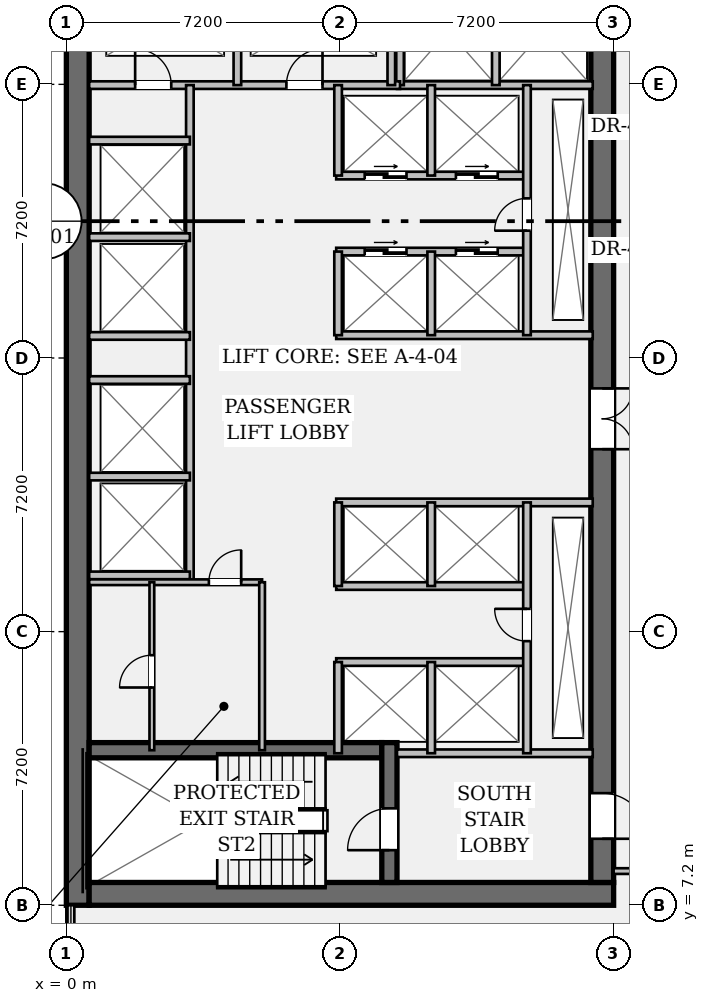
"""IFC4 building model, lengths in metres.
Left out: names, types, materials, properties, quantities, classifications, styles, units other than length and angle.
Written with IfcOpenShell. Run it as: python <this file> out.ifc"""

import sys

from ifc_helpers import new_model, si_unit, direction, frame, frame_2d, origin, place, context, subcontext, project, spatial, rectangle, extrude, element, fill, save


model = new_model("IFC4")
c1 = context("Model", 3, precision=1e-05, world=origin(), true_north=direction((0.0, 1.0)))
c2 = subcontext(c1, "Body", "Model", "MODEL_VIEW")
j1 = project(units=[si_unit("LENGTHUNIT", "METRE"), si_unit("PLANEANGLEUNIT", "RADIAN")], contexts=[c1])
p1 = place(None, origin())
s1 = spatial("IfcSite", under=j1, at=p1, CompositionType="ELEMENT")
p2 = place(p1, origin())
s2 = spatial("IfcBuilding", under=s1, at=p2, CompositionType="ELEMENT")
p3 = place(p2, frame((0.0, 0.0, 31.15)))
s3 = spatial("IfcBuildingStorey", under=s2, at=p3, CompositionType="ELEMENT", Elevation=31.15)
p4 = place(p3, frame((0.3, 7.2, 0.0), z_axis=(0.0, 0.0, 1.0), x_axis=(0.0, 1.0, 0.0)))
e1 = element("IfcWall", 1, at=p4, inside=s3, PredefinedType="SHEAR", context=c2, shape_type="SweptSolid", body=[
    extrude(rectangle(XDim=28.8, YDim=0.6, at=frame_2d((14.4, 0.0))), origin(), (0.0, 0.0, 1.0), 3.57),
])
p5 = place(p3, frame((0.6, 7.5, 0.0), z_axis=(0.0, 0.0, 1.0), x_axis=(1.0, 0.0, 0.0)))
e2 = element("IfcWall", 2, at=p5, inside=s3, PredefinedType="SHEAR", context=c2, shape_type="SweptSolid", body=[
    extrude(rectangle(XDim=13.8, YDim=0.6, at=frame_2d((6.9, 0.0))), origin(), (0.0, 0.0, 1.0), 3.57),
])
p6 = place(p3, frame((14.1, 35.4, 0.0), z_axis=(0.0, 0.0, 1.0), x_axis=(0.0, -1.0, 0.0)))
e3 = element("IfcWall", 3, at=p6, inside=s3, PredefinedType="SHEAR", context=c2, shape_type="SweptSolid", body=[
    extrude(rectangle(XDim=27.6, YDim=0.6, at=frame_2d((13.8, 0.0))), origin(), (0.0, 0.0, 1.0), 3.57),
])
p7 = place(p6, frame((1.3, 0.0, 0.0)))
e4 = element("IfcOpeningElement", 4, at=p7, cuts=e3, PredefinedType="OPENING", context=c2, shape_type="SweptSolid", body=[
    extrude(rectangle(XDim=1.2, YDim=2.15, at=frame_2d((0.6, 1.075))), frame((0.0, 0.312, 0.0), z_axis=(0.0, -1.0, 0.0), x_axis=(1.0, 0.0, 0.0)), (0.0, 0.0, 1.0), 0.624),
])
p8 = place(p6, frame((25.25, 0.0, 0.0)))
e5 = element("IfcOpeningElement", 5, at=p8, cuts=e3, PredefinedType="OPENING", context=c2, shape_type="SweptSolid", body=[
    extrude(rectangle(XDim=1.2, YDim=2.15, at=frame_2d((0.6, 1.075))), frame((0.0, 0.312, 0.0), z_axis=(0.0, -1.0, 0.0), x_axis=(1.0, 0.0, 0.0)), (0.0, 0.0, 1.0), 0.624),
])
p9 = place(p6, frame((14.6, 0.0, 0.0)))
e6 = element("IfcOpeningElement", 6, at=p9, cuts=e3, PredefinedType="OPENING", context=c2, shape_type="SweptSolid", body=[
    extrude(rectangle(XDim=1.6, YDim=2.2, at=frame_2d((0.8, 1.1))), frame((0.0, 0.312, 0.0), z_axis=(0.0, -1.0, 0.0), x_axis=(1.0, 0.0, 0.0)), (0.0, 0.0, 1.0), 0.624),
])
p10 = place(p3, frame((0.6, 11.28, 0.0), z_axis=(0.0, 0.0, 1.0), x_axis=(1.0, 0.0, 0.0)))
e7 = element("IfcWall", 7, at=p10, inside=s3, PredefinedType="SHEAR", context=c2, shape_type="SweptSolid", body=[
    extrude(rectangle(XDim=7.7, YDim=0.4, at=frame_2d((3.85, 0.0))), origin(), (0.0, 0.0, 1.0), 3.57),
])
p11 = place(p3, frame((8.5, 7.8, 0.0), z_axis=(0.0, 0.0, 1.0), x_axis=(0.0, 1.0, 0.0)))
e8 = element("IfcWall", 8, at=p11, inside=s3, PredefinedType="SHEAR", context=c2, shape_type="SweptSolid", body=[
    extrude(rectangle(XDim=3.68, YDim=0.4, at=frame_2d((1.84, 0.0))), origin(), (0.0, 0.0, 1.0), 3.57),
])
p12 = place(p11, frame((0.85, 0.0, 0.0)))
e9 = element("IfcOpeningElement", 9, at=p12, cuts=e8, PredefinedType="OPENING", context=c2, shape_type="SweptSolid", body=[
    extrude(rectangle(XDim=1.1, YDim=2.15, at=frame_2d((0.55, 1.075))), frame((0.0, 0.212, 0.0), z_axis=(0.0, -1.0, 0.0), x_axis=(1.0, 0.0, 0.0)), (0.0, 0.0, 1.0), 0.424),
])
for number, where, z_axis, x_axis in (
    (10, (8.7, 11.2, 0.0), (0.0, 0.0, 1.0), (1.0, 0.0, 0.0)),
    (11, (8.7, 28.78, 0.0), (0.0, 0.0, 1.0), (1.0, 0.0, 0.0)),
):
    element("IfcWall", number, at=place(p3, frame(where, z_axis=z_axis, x_axis=x_axis)), inside=s3, PredefinedType="PARTITIONING", context=c2, shape_type="SweptSolid", body=[
        extrude(rectangle(XDim=5.15, YDim=0.2, at=frame_2d((2.575, 0.0))), origin(), (0.0, 0.0, 1.0), 3.57),
    ])
for number, where, z_axis, x_axis in (
    (12, (8.78, 28.78, 0.0), (0.0, 0.0, 1.0), (0.0, 1.0, 0.0)),
    (13, (11.3, 28.78, 0.0), (0.0, 0.0, 1.0), (0.0, 1.0, 0.0)),
):
    element("IfcWall", number, at=place(p3, frame(where, z_axis=z_axis, x_axis=x_axis)), inside=s3, PredefinedType="PARTITIONING", context=c2, shape_type="SweptSolid", body=[
        extrude(rectangle(XDim=3.1, YDim=0.2, at=frame_2d((1.55, 0.0))), origin(), (0.0, 0.0, 1.0), 3.57),
    ])
p13 = place(p3, frame((0.6, 28.78, 0.0), z_axis=(0.0, 0.0, 1.0), x_axis=(1.0, 0.0, 0.0)))
e14 = element("IfcWall", 14, at=p13, inside=s3, PredefinedType="PARTITIONING", context=c2, shape_type="SweptSolid", body=[
    extrude(rectangle(XDim=8.18, YDim=0.2, at=frame_2d((4.09, 0.0))), origin(), (0.0, 0.0, 1.0), 3.57),
])
p14 = place(p13, frame((1.21, 0.0, 0.0)))
e15 = element("IfcOpeningElement", 15, at=p14, cuts=e14, PredefinedType="OPENING", context=c2, shape_type="SweptSolid", body=[
    extrude(rectangle(XDim=0.95, YDim=2.15, at=frame_2d((0.475, 1.075))), frame((0.0, 0.112, 0.0), z_axis=(0.0, -1.0, 0.0), x_axis=(1.0, 0.0, 0.0)), (0.0, 0.0, 1.0), 0.224),
])
p15 = place(p13, frame((5.19, 0.0, 0.0)))
e16 = element("IfcOpeningElement", 16, at=p15, cuts=e14, PredefinedType="OPENING", context=c2, shape_type="SweptSolid", body=[
    extrude(rectangle(XDim=0.95, YDim=2.15, at=frame_2d((0.475, 1.075))), frame((0.0, 0.112, 0.0), z_axis=(0.0, -1.0, 0.0), x_axis=(1.0, 0.0, 0.0)), (0.0, 0.0, 1.0), 0.224),
])
for number, where, z_axis, x_axis in (
    (17, (4.5, 28.78, 0.0), (0.0, 0.0, 1.0), (0.0, 1.0, 0.0)),
    (18, (8.55, 28.78, 0.0), (0.0, 0.0, 1.0), (0.0, 1.0, 0.0)),
):
    element("IfcWall", number, at=place(p3, frame(where, z_axis=z_axis, x_axis=x_axis)), inside=s3, PredefinedType="PARTITIONING", context=c2, shape_type="SweptSolid", body=[
        extrude(rectangle(XDim=2.94, YDim=0.2, at=frame_2d((1.47, 0.0))), origin(), (0.0, 0.0, 1.0), 3.57),
    ])
p16 = place(p3, frame((3.25, 15.7, 0.0), z_axis=(0.0, 0.0, 1.0), x_axis=(0.0, 1.0, 0.0)))
e19 = element("IfcWall", 19, at=p16, inside=s3, PredefinedType="PARTITIONING", context=c2, shape_type="SweptSolid", body=[
    extrude(rectangle(XDim=13.08, YDim=0.2, at=frame_2d((6.54, 0.0))), origin(), (0.0, 0.0, 1.0), 3.57),
])
for number, where, z_axis, x_axis in (
    (20, (0.6, 15.88, 0.0), (0.0, 0.0, 1.0), (1.0, 0.0, 0.0)),
    (21, (0.6, 18.48, 0.0), (0.0, 0.0, 1.0), (1.0, 0.0, 0.0)),
    (22, (0.6, 22.18, 0.0), (0.0, 0.0, 1.0), (1.0, 0.0, 0.0)),
    (23, (0.6, 24.78, 0.0), (0.0, 0.0, 1.0), (1.0, 0.0, 0.0)),
    (24, (0.6, 21.02, 0.0), (0.0, 0.0, 1.0), (1.0, 0.0, 0.0)),
    (25, (0.6, 27.32, 0.0), (0.0, 0.0, 1.0), (1.0, 0.0, 0.0)),
):
    element("IfcWall", number, at=place(p3, frame(where, z_axis=z_axis, x_axis=x_axis)), inside=s3, PredefinedType="PARTITIONING", context=c2, shape_type="SweptSolid", body=[
        extrude(rectangle(XDim=2.65, YDim=0.2, at=frame_2d((1.325, 0.0))), origin(), (0.0, 0.0, 1.0), 3.57),
    ])
p17 = place(p3, frame((7.1, 22.2, 0.0), z_axis=(0.0, 0.0, 1.0), x_axis=(1.0, 0.0, 0.0)))
e26 = element("IfcWall", 26, at=p17, inside=s3, PredefinedType="PARTITIONING", context=c2, shape_type="SweptSolid", body=[
    extrude(rectangle(XDim=6.75, YDim=0.2, at=frame_2d((3.375, 0.0))), origin(), (0.0, 0.0, 1.0), 3.57),
])
p18 = place(p3, frame((7.1, 24.4, 0.0), z_axis=(0.0, 0.0, 1.0), x_axis=(1.0, 0.0, 0.0)))
e27 = element("IfcWall", 27, at=p18, inside=s3, PredefinedType="PARTITIONING", context=c2, shape_type="SweptSolid", body=[
    extrude(rectangle(XDim=5.02, YDim=0.2, at=frame_2d((2.51, 0.0))), origin(), (0.0, 0.0, 1.0), 3.57),
])
p19 = place(p18, frame((0.75, 0.0, 0.0)))
e28 = element("IfcOpeningElement", 28, at=p19, cuts=e27, PredefinedType="OPENING", context=c2, shape_type="SweptSolid", body=[
    extrude(rectangle(XDim=1.1, YDim=2.2, at=frame_2d((0.55, 1.1))), frame((0.0, 0.112, 0.0), z_axis=(0.0, -1.0, 0.0), x_axis=(1.0, 0.0, 0.0)), (0.0, 0.0, 1.0), 0.224),
])
p20 = place(p18, frame((3.15, 0.0, 0.0)))
e29 = element("IfcOpeningElement", 29, at=p20, cuts=e27, PredefinedType="OPENING", context=c2, shape_type="SweptSolid", body=[
    extrude(rectangle(XDim=1.1, YDim=2.2, at=frame_2d((0.55, 1.1))), frame((0.0, 0.112, 0.0), z_axis=(0.0, -1.0, 0.0), x_axis=(1.0, 0.0, 0.0)), (0.0, 0.0, 1.0), 0.224),
])
p21 = place(p3, frame((7.1, 26.4, 0.0), z_axis=(0.0, 0.0, 1.0), x_axis=(1.0, 0.0, 0.0)))
e30 = element("IfcWall", 30, at=p21, inside=s3, PredefinedType="PARTITIONING", context=c2, shape_type="SweptSolid", body=[
    extrude(rectangle(XDim=5.02, YDim=0.2, at=frame_2d((2.51, 0.0))), origin(), (0.0, 0.0, 1.0), 3.57),
])
p22 = place(p21, frame((0.75, 0.0, 0.0)))
e31 = element("IfcOpeningElement", 31, at=p22, cuts=e30, PredefinedType="OPENING", context=c2, shape_type="SweptSolid", body=[
    extrude(rectangle(XDim=1.1, YDim=2.2, at=frame_2d((0.55, 1.1))), frame((0.0, 0.112, 0.0), z_axis=(0.0, -1.0, 0.0), x_axis=(1.0, 0.0, 0.0)), (0.0, 0.0, 1.0), 0.224),
])
p23 = place(p21, frame((3.15, 0.0, 0.0)))
e32 = element("IfcOpeningElement", 32, at=p23, cuts=e30, PredefinedType="OPENING", context=c2, shape_type="SweptSolid", body=[
    extrude(rectangle(XDim=1.1, YDim=2.2, at=frame_2d((0.55, 1.1))), frame((0.0, 0.112, 0.0), z_axis=(0.0, -1.0, 0.0), x_axis=(1.0, 0.0, 0.0)), (0.0, 0.0, 1.0), 0.224),
])
p24 = place(p3, frame((7.15, 22.2, 0.0), z_axis=(0.0, 0.0, 1.0), x_axis=(0.0, 1.0, 0.0)))
e33 = element("IfcWall", 33, at=p24, inside=s3, PredefinedType="PARTITIONING", context=c2, shape_type="SweptSolid", body=[
    extrude(rectangle(XDim=2.2, YDim=0.2, at=frame_2d((1.1, 0.0))), origin(), (0.0, 0.0, 1.0), 3.57),
])
p25 = place(p3, frame((7.15, 26.4, 0.0), z_axis=(0.0, 0.0, 1.0), x_axis=(0.0, 1.0, 0.0)))
e34 = element("IfcWall", 34, at=p25, inside=s3, PredefinedType="PARTITIONING", context=c2, shape_type="SweptSolid", body=[
    extrude(rectangle(XDim=2.38, YDim=0.2, at=frame_2d((1.19, 0.0))), origin(), (0.0, 0.0, 1.0), 3.57),
])
p26 = place(p3, frame((9.6, 22.2, 0.0), z_axis=(0.0, 0.0, 1.0), x_axis=(0.0, 1.0, 0.0)))
e35 = element("IfcWall", 35, at=p26, inside=s3, PredefinedType="PARTITIONING", context=c2, shape_type="SweptSolid", body=[
    extrude(rectangle(XDim=2.2, YDim=0.2, at=frame_2d((1.1, 0.0))), origin(), (0.0, 0.0, 1.0), 3.57),
])
p27 = place(p3, frame((9.6, 26.4, 0.0), z_axis=(0.0, 0.0, 1.0), x_axis=(0.0, 1.0, 0.0)))
e36 = element("IfcWall", 36, at=p27, inside=s3, PredefinedType="PARTITIONING", context=c2, shape_type="SweptSolid", body=[
    extrude(rectangle(XDim=2.38, YDim=0.2, at=frame_2d((1.19, 0.0))), origin(), (0.0, 0.0, 1.0), 3.57),
])
p28 = place(p3, frame((12.12, 22.2, 0.0), z_axis=(0.0, 0.0, 1.0), x_axis=(0.0, 1.0, 0.0)))
e37 = element("IfcWall", 37, at=p28, inside=s3, PredefinedType="PARTITIONING", context=c2, shape_type="SweptSolid", body=[
    extrude(rectangle(XDim=6.58, YDim=0.2, at=frame_2d((3.29, 0.0))), origin(), (0.0, 0.0, 1.0), 3.57),
])
p29 = place(p28, frame((2.75, 0.0, 0.0)))
e38 = element("IfcOpeningElement", 38, at=p29, cuts=e37, PredefinedType="OPENING", context=c2, shape_type="SweptSolid", body=[
    extrude(rectangle(XDim=0.85, YDim=2.15, at=frame_2d((0.425, 1.075))), frame((0.0, 0.112, 0.0), z_axis=(0.0, -1.0, 0.0), x_axis=(1.0, 0.0, 0.0)), (0.0, 0.0, 1.0), 0.224),
])
p30 = place(p3, frame((7.1, 17.8, 0.0), z_axis=(0.0, 0.0, 1.0), x_axis=(1.0, 0.0, 0.0)))
e39 = element("IfcWall", 39, at=p30, inside=s3, PredefinedType="PARTITIONING", context=c2, shape_type="SweptSolid", body=[
    extrude(rectangle(XDim=6.75, YDim=0.2, at=frame_2d((3.375, 0.0))), origin(), (0.0, 0.0, 1.0), 3.57),
])
for number, where, z_axis, x_axis in (
    (40, (7.1, 15.6, 0.0), (0.0, 0.0, 1.0), (1.0, 0.0, 0.0)),
    (41, (7.1, 13.6, 0.0), (0.0, 0.0, 1.0), (1.0, 0.0, 0.0)),
):
    element("IfcWall", number, at=place(p3, frame(where, z_axis=z_axis, x_axis=x_axis)), inside=s3, PredefinedType="PARTITIONING", context=c2, shape_type="SweptSolid", body=[
        extrude(rectangle(XDim=5.02, YDim=0.2, at=frame_2d((2.51, 0.0))), origin(), (0.0, 0.0, 1.0), 3.57),
    ])
p31 = place(p3, frame((7.15, 15.6, 0.0), z_axis=(0.0, 0.0, 1.0), x_axis=(0.0, 1.0, 0.0)))
e42 = element("IfcWall", 42, at=p31, inside=s3, PredefinedType="PARTITIONING", context=c2, shape_type="SweptSolid", body=[
    extrude(rectangle(XDim=2.2, YDim=0.2, at=frame_2d((1.1, 0.0))), origin(), (0.0, 0.0, 1.0), 3.57),
])
p32 = place(p3, frame((7.15, 11.2, 0.0), z_axis=(0.0, 0.0, 1.0), x_axis=(0.0, 1.0, 0.0)))
e43 = element("IfcWall", 43, at=p32, inside=s3, PredefinedType="PARTITIONING", context=c2, shape_type="SweptSolid", body=[
    extrude(rectangle(XDim=2.4, YDim=0.2, at=frame_2d((1.2, 0.0))), origin(), (0.0, 0.0, 1.0), 3.57),
])
p33 = place(p3, frame((9.6, 15.6, 0.0), z_axis=(0.0, 0.0, 1.0), x_axis=(0.0, 1.0, 0.0)))
e44 = element("IfcWall", 44, at=p33, inside=s3, PredefinedType="PARTITIONING", context=c2, shape_type="SweptSolid", body=[
    extrude(rectangle(XDim=2.2, YDim=0.2, at=frame_2d((1.1, 0.0))), origin(), (0.0, 0.0, 1.0), 3.57),
])
p34 = place(p3, frame((9.6, 11.2, 0.0), z_axis=(0.0, 0.0, 1.0), x_axis=(0.0, 1.0, 0.0)))
e45 = element("IfcWall", 45, at=p34, inside=s3, PredefinedType="PARTITIONING", context=c2, shape_type="SweptSolid", body=[
    extrude(rectangle(XDim=2.4, YDim=0.2, at=frame_2d((1.2, 0.0))), origin(), (0.0, 0.0, 1.0), 3.57),
])
p35 = place(p3, frame((12.12, 11.2, 0.0), z_axis=(0.0, 0.0, 1.0), x_axis=(0.0, 1.0, 0.0)))
e46 = element("IfcWall", 46, at=p35, inside=s3, PredefinedType="PARTITIONING", context=c2, shape_type="SweptSolid", body=[
    extrude(rectangle(XDim=6.6, YDim=0.2, at=frame_2d((3.3, 0.0))), origin(), (0.0, 0.0, 1.0), 3.57),
])
p36 = place(p35, frame((2.95, 0.0, 0.0)))
e47 = element("IfcOpeningElement", 47, at=p36, cuts=e46, PredefinedType="OPENING", context=c2, shape_type="SweptSolid", body=[
    extrude(rectangle(XDim=0.85, YDim=2.15, at=frame_2d((0.425, 1.075))), frame((0.0, 0.112, 0.0), z_axis=(0.0, -1.0, 0.0), x_axis=(1.0, 0.0, 0.0)), (0.0, 0.0, 1.0), 0.224),
])
p37 = place(p3, frame((0.6, 15.7, 0.0), z_axis=(0.0, 0.0, 1.0), x_axis=(1.0, 0.0, 0.0)))
e48 = element("IfcWall", 48, at=p37, inside=s3, PredefinedType="PARTITIONING", context=c2, shape_type="SweptSolid", body=[
    extrude(rectangle(XDim=4.55, YDim=0.15, at=frame_2d((2.275, 0.0))), origin(), (0.0, 0.0, 1.0), 3.57),
])
p38 = place(p37, frame((3.15, 0.0, 0.0)))
e49 = element("IfcOpeningElement", 49, at=p38, cuts=e48, PredefinedType="OPENING", context=c2, shape_type="SweptSolid", body=[
    extrude(rectangle(XDim=0.85, YDim=2.15, at=frame_2d((0.425, 1.075))), frame((0.0, 0.087, 0.0), z_axis=(0.0, -1.0, 0.0), x_axis=(1.0, 0.0, 0.0)), (0.0, 0.0, 1.0), 0.174),
])
p39 = place(p3, frame((5.15, 11.28, 0.0), z_axis=(0.0, 0.0, 1.0), x_axis=(0.0, 1.0, 0.0)))
e50 = element("IfcWall", 50, at=p39, inside=s3, PredefinedType="PARTITIONING", context=c2, shape_type="SweptSolid", body=[
    extrude(rectangle(XDim=4.42, YDim=0.15, at=frame_2d((2.21, 0.0))), origin(), (0.0, 0.0, 1.0), 3.57),
])
p40 = place(p3, frame((2.25, 11.28, 0.0), z_axis=(0.0, 0.0, 1.0), x_axis=(0.0, 1.0, 0.0)))
e51 = element("IfcWall", 51, at=p40, inside=s3, PredefinedType="PARTITIONING", context=c2, shape_type="SweptSolid", body=[
    extrude(rectangle(XDim=4.42, YDim=0.125, at=frame_2d((2.21, 0.0))), origin(), (0.0, 0.0, 1.0), 3.57),
])
p41 = place(p40, frame((1.65, 0.0, 0.0)))
e52 = element("IfcOpeningElement", 52, at=p41, cuts=e51, PredefinedType="OPENING", context=c2, shape_type="SweptSolid", body=[
    extrude(rectangle(XDim=0.85, YDim=2.15, at=frame_2d((0.425, 1.075))), frame((0.0, 0.074, 0.0), z_axis=(0.0, -1.0, 0.0), x_axis=(1.0, 0.0, 0.0)), (0.0, 0.0, 1.0), 0.149),
])
p42 = place(p3, frame((14.4, 8.1, 0.0), z_axis=(0.0, 0.0, 1.0), x_axis=(1.0, 0.0, 0.0)))
e53 = element("IfcWall", 53, at=p42, inside=s3, PredefinedType="PARTITIONING", context=c2, shape_type="SweptSolid", body=[
    extrude(rectangle(XDim=2.95, YDim=0.15, at=frame_2d((1.475, 0.0))), origin(), (0.0, 0.0, 1.0), 2.628),
])
p43 = place(p42, frame((0.95, 0.0, 0.0)))
e54 = element("IfcOpeningElement", 54, at=p43, cuts=e53, PredefinedType="OPENING", context=c2, shape_type="SweptSolid", body=[
    extrude(rectangle(XDim=0.95, YDim=2.15, at=frame_2d((0.475, 1.075))), frame((0.0, 0.087, 0.0), z_axis=(0.0, -1.0, 0.0), x_axis=(1.0, 0.0, 0.0)), (0.0, 0.0, 1.0), 0.174),
])
p44 = place(p12, origin())
e55 = element("IfcDoor", 55, at=p44, inside=s3, OperationType="SINGLE_SWING_LEFT", PredefinedType="DOOR", context=c2, shape_type="SweptSolid", body=[
    extrude(rectangle(XDim=1.1, YDim=2.15, at=frame_2d((0.55, 1.075))), frame((0.0, 0.025, 0.0), z_axis=(0.0, -1.0, 0.0), x_axis=(1.0, 0.0, 0.0)), (0.0, 0.0, 1.0), 0.05),
])
fill(e9, e55)
p45 = place(p8, origin())
e56 = element("IfcDoor", 56, at=p45, inside=s3, OperationType="SINGLE_SWING_RIGHT", PredefinedType="DOOR", context=c2, shape_type="SweptSolid", body=[
    extrude(rectangle(XDim=1.2, YDim=2.15, at=frame_2d((0.6, 1.075))), frame((0.0, 0.025, 0.0), z_axis=(0.0, -1.0, 0.0), x_axis=(1.0, 0.0, 0.0)), (0.0, 0.0, 1.0), 0.05),
])
fill(e5, e56)
p46 = place(p14, origin())
e57 = element("IfcDoor", 57, at=p46, inside=s3, OperationType="SINGLE_SWING_LEFT", PredefinedType="DOOR", context=c2, shape_type="SweptSolid", body=[
    extrude(rectangle(XDim=0.95, YDim=2.15, at=frame_2d((0.475, 1.075))), frame((0.0, 0.025, 0.0), z_axis=(0.0, -1.0, 0.0), x_axis=(1.0, 0.0, 0.0)), (0.0, 0.0, 1.0), 0.05),
])
fill(e15, e57)
p47 = place(p15, origin())
e58 = element("IfcDoor", 58, at=p47, inside=s3, OperationType="SINGLE_SWING_RIGHT", PredefinedType="DOOR", context=c2, shape_type="SweptSolid", body=[
    extrude(rectangle(XDim=0.95, YDim=2.15, at=frame_2d((0.475, 1.075))), frame((0.0, 0.025, 0.0), z_axis=(0.0, -1.0, 0.0), x_axis=(1.0, 0.0, 0.0)), (0.0, 0.0, 1.0), 0.05),
])
fill(e16, e58)
p48 = place(p9, origin())
e59 = element("IfcDoor", 59, at=p48, inside=s3, OperationType="DOUBLE_DOOR_SINGLE_SWING", PredefinedType="DOOR", context=c2, shape_type="SweptSolid", body=[
    extrude(rectangle(XDim=1.6, YDim=2.2, at=frame_2d((0.8, 1.1))), frame((0.0, 0.025, 0.0), z_axis=(0.0, -1.0, 0.0), x_axis=(1.0, 0.0, 0.0)), (0.0, 0.0, 1.0), 0.05),
])
fill(e6, e59)
p49 = place(p29, origin())
e60 = element("IfcDoor", 60, at=p49, inside=s3, OperationType="SINGLE_SWING_LEFT", PredefinedType="DOOR", context=c2, shape_type="SweptSolid", body=[
    extrude(rectangle(XDim=0.85, YDim=2.15, at=frame_2d((0.425, 1.075))), frame((0.0, 0.025, 0.0), z_axis=(0.0, -1.0, 0.0), x_axis=(1.0, 0.0, 0.0)), (0.0, 0.0, 1.0), 0.05),
])
fill(e38, e60)
p50 = place(p19, origin())
e61 = element("IfcDoor", 61, at=p50, inside=s3, OperationType="DOUBLE_DOOR_SLIDING", PredefinedType="DOOR", context=c2, shape_type="SweptSolid", body=[
    extrude(rectangle(XDim=1.1, YDim=2.2, at=frame_2d((0.55, 1.1))), frame((0.0, 0.025, 0.0), z_axis=(0.0, -1.0, 0.0), x_axis=(1.0, 0.0, 0.0)), (0.0, 0.0, 1.0), 0.05),
])
fill(e28, e61)
p51 = place(p20, origin())
e62 = element("IfcDoor", 62, at=p51, inside=s3, OperationType="DOUBLE_DOOR_SLIDING", PredefinedType="DOOR", context=c2, shape_type="SweptSolid", body=[
    extrude(rectangle(XDim=1.1, YDim=2.2, at=frame_2d((0.55, 1.1))), frame((0.0, 0.025, 0.0), z_axis=(0.0, -1.0, 0.0), x_axis=(1.0, 0.0, 0.0)), (0.0, 0.0, 1.0), 0.05),
])
fill(e29, e62)
p52 = place(p22, origin())
e63 = element("IfcDoor", 63, at=p52, inside=s3, OperationType="DOUBLE_DOOR_SLIDING", PredefinedType="DOOR", context=c2, shape_type="SweptSolid", body=[
    extrude(rectangle(XDim=1.1, YDim=2.2, at=frame_2d((0.55, 1.1))), frame((0.0, 0.025, 0.0), z_axis=(0.0, -1.0, 0.0), x_axis=(1.0, 0.0, 0.0)), (0.0, 0.0, 1.0), 0.05),
])
fill(e31, e63)
p53 = place(p23, origin())
e64 = element("IfcDoor", 64, at=p53, inside=s3, OperationType="DOUBLE_DOOR_SLIDING", PredefinedType="DOOR", context=c2, shape_type="SweptSolid", body=[
    extrude(rectangle(XDim=1.1, YDim=2.2, at=frame_2d((0.55, 1.1))), frame((0.0, 0.025, 0.0), z_axis=(0.0, -1.0, 0.0), x_axis=(1.0, 0.0, 0.0)), (0.0, 0.0, 1.0), 0.05),
])
fill(e32, e64)
p54 = place(p36, origin())
e65 = element("IfcDoor", 65, at=p54, inside=s3, OperationType="SINGLE_SWING_RIGHT", PredefinedType="DOOR", context=c2, shape_type="SweptSolid", body=[
    extrude(rectangle(XDim=0.85, YDim=2.15, at=frame_2d((0.425, 1.075))), frame((0.0, 0.025, 0.0), z_axis=(0.0, -1.0, 0.0), x_axis=(1.0, 0.0, 0.0)), (0.0, 0.0, 1.0), 0.05),
])
fill(e47, e65)
p55 = place(p38, origin())
e66 = element("IfcDoor", 66, at=p55, inside=s3, OperationType="SINGLE_SWING_RIGHT", PredefinedType="DOOR", context=c2, shape_type="SweptSolid", body=[
    extrude(rectangle(XDim=0.85, YDim=2.15, at=frame_2d((0.425, 1.075))), frame((0.0, 0.025, 0.0), z_axis=(0.0, -1.0, 0.0), x_axis=(1.0, 0.0, 0.0)), (0.0, 0.0, 1.0), 0.05),
])
fill(e49, e66)
p56 = place(p41, origin())
e67 = element("IfcDoor", 67, at=p56, inside=s3, OperationType="SINGLE_SWING_LEFT", PredefinedType="DOOR", context=c2, shape_type="SweptSolid", body=[
    extrude(rectangle(XDim=0.85, YDim=2.15, at=frame_2d((0.425, 1.075))), frame((0.0, 0.025, 0.0), z_axis=(0.0, -1.0, 0.0), x_axis=(1.0, 0.0, 0.0)), (0.0, 0.0, 1.0), 0.05),
])
fill(e52, e67)
save(model, sys.argv[1])
